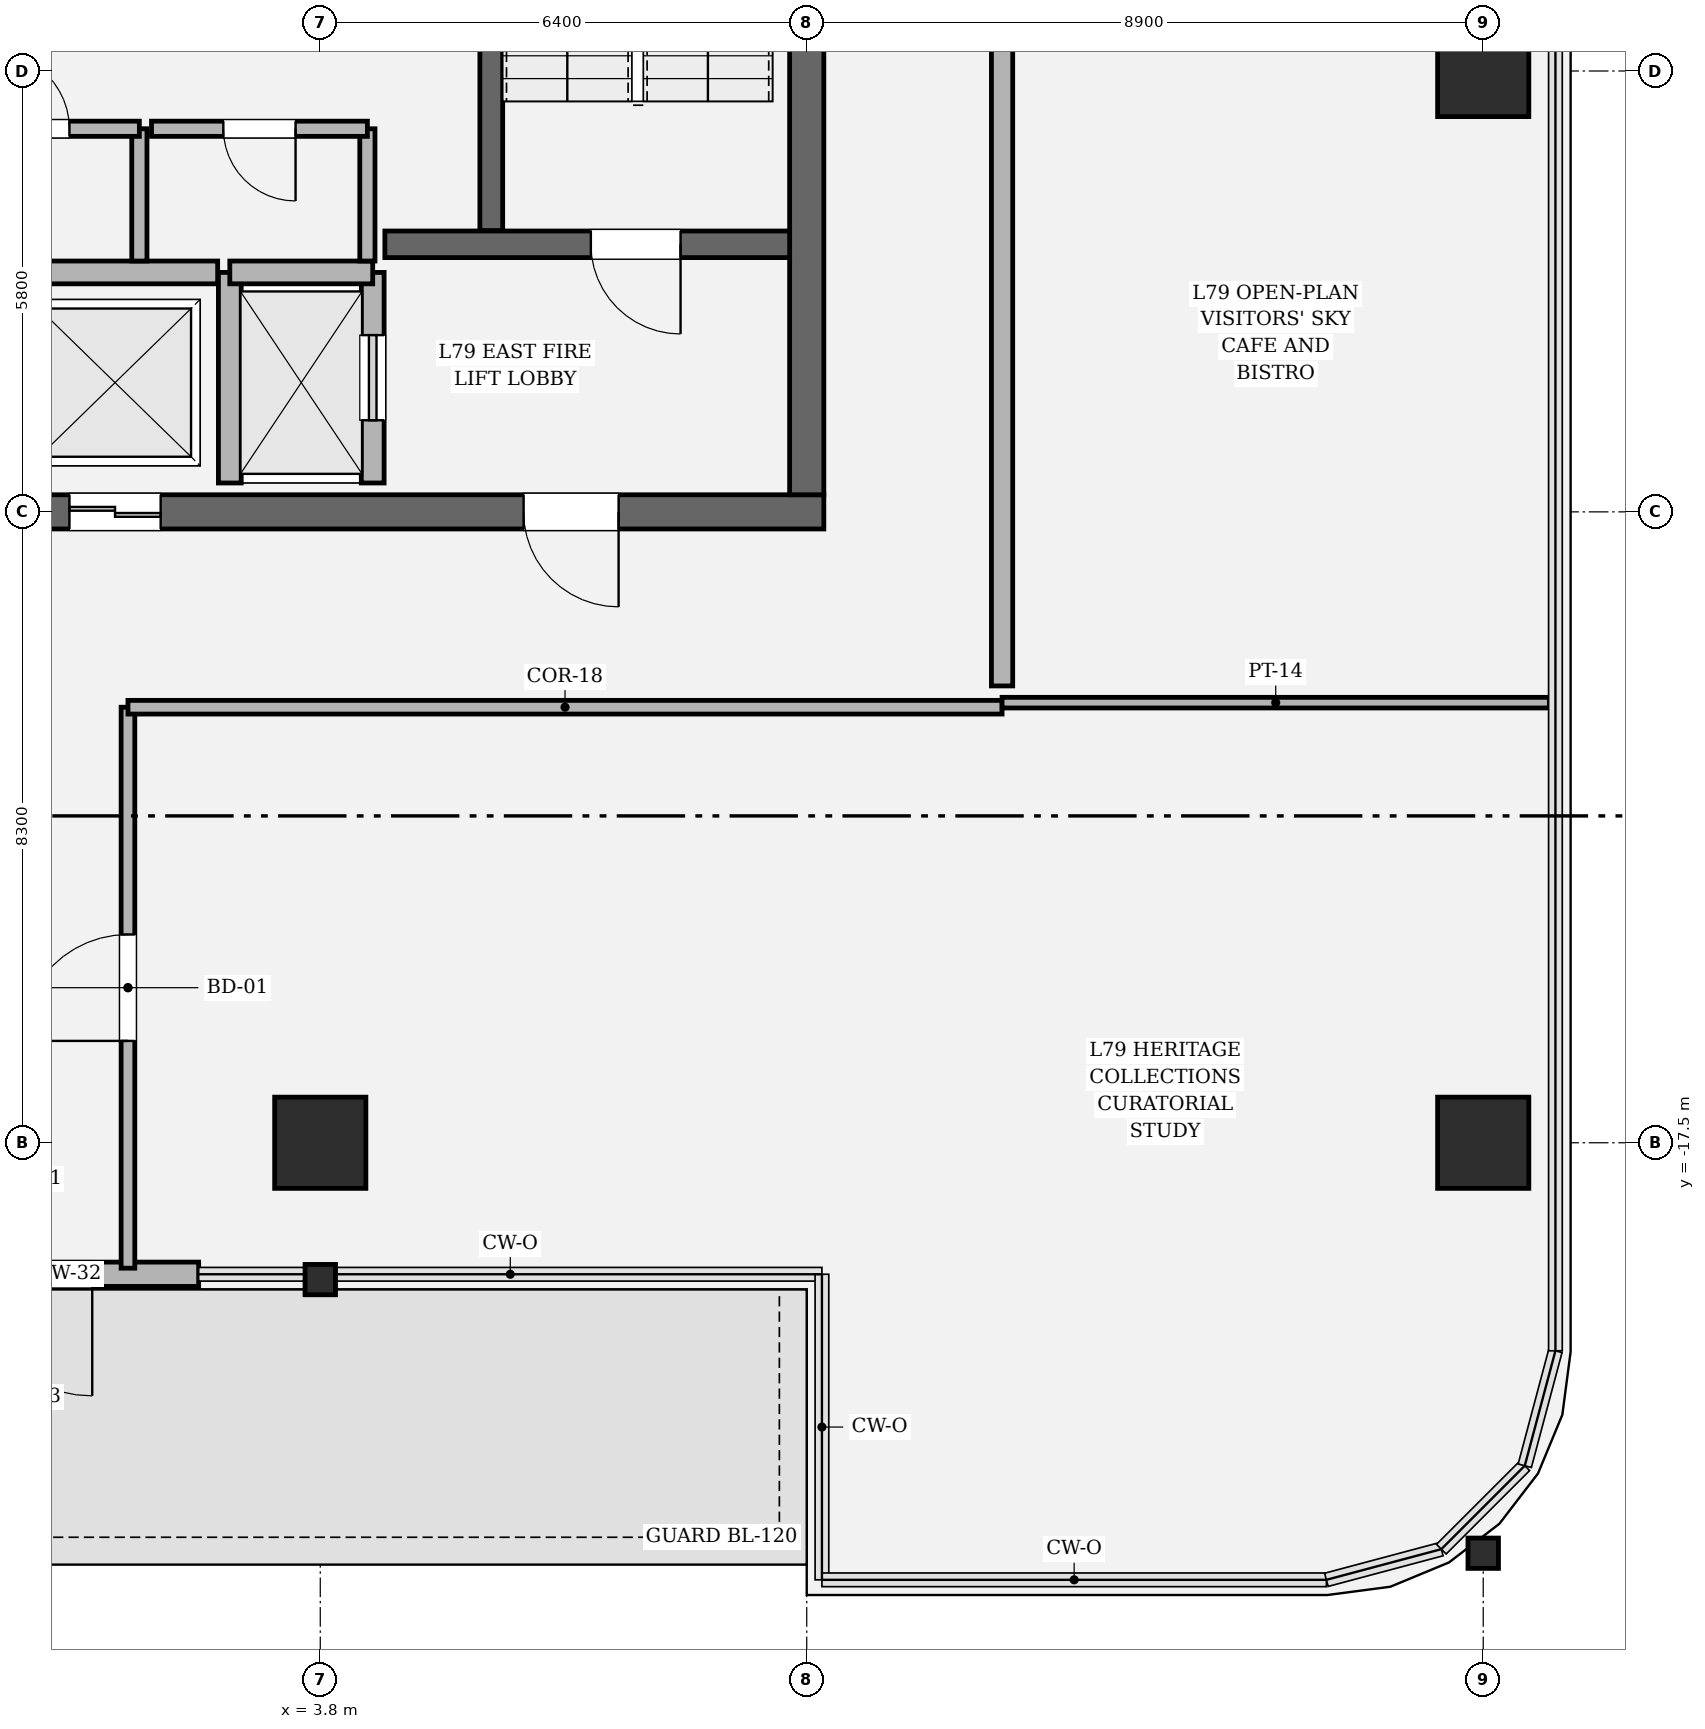
"""IFC4 building model, lengths in metres.
Left out: names, types, materials, properties, quantities, classifications, styles, units other than length and angle.
Written with IfcOpenShell. Run it as: python <this file> out.ifc"""

import sys

from ifc_helpers import new_model, si_unit, direction, frame, frame_2d, origin, origin_2d, place, context, subcontext, project, spatial, rectangle, hollow_rectangle, i_section, extrude, element, fill, save


model = new_model("IFC4")
c1 = context("Model", 3, precision=1e-05, world=origin(), true_north=direction((0.0, 1.0)))
c2 = subcontext(c1, "Body", "Model", "MODEL_VIEW")
j1 = project(units=[si_unit("LENGTHUNIT", "METRE"), si_unit("PLANEANGLEUNIT", "RADIAN")], contexts=[c1])
p1 = place(None, origin())
s1 = spatial("IfcSite", under=j1, at=p1, CompositionType="ELEMENT")
p2 = place(p1, origin())
s2 = spatial("IfcBuilding", under=s1, at=p2, CompositionType="ELEMENT")
p3 = place(p2, frame((0.0, 0.0, 334.2)))
s3 = spatial("IfcBuildingStorey", under=s2, at=p3, CompositionType="ELEMENT", Elevation=334.2)
p4 = place(p3, frame((10.425, -9.2, 0.0), z_axis=(0.0, 0.0, 1.0), x_axis=(-1.0, 0.0, 0.0)))
e1 = element("IfcWall", 1, at=p4, inside=s3, PredefinedType="SHEAR", context=c2, shape_type="SweptSolid", body=[
    extrude(rectangle(XDim=20.85, YDim=0.45, at=frame_2d((10.425, 0.0))), origin(), (0.0, 0.0, 1.0), 4.8),
])
p5 = place(p4, frame((2.7, 0.0, 0.0)))
e2 = element("IfcOpeningElement", 2, at=p5, cuts=e1, PredefinedType="OPENING", context=c2, shape_type="SweptSolid", body=[
    extrude(rectangle(XDim=1.25, YDim=2.25, at=frame_2d((0.625, 1.125))), frame((0.0, 0.235, 0.0), z_axis=(0.0, -1.0, 0.0), x_axis=(1.0, 0.0, 0.0)), (0.0, 0.0, 1.0), 0.47),
])
p6 = place(p4, frame((16.9, 0.0, 0.0)))
e3 = element("IfcOpeningElement", 3, at=p6, cuts=e1, PredefinedType="OPENING", context=c2, shape_type="SweptSolid", body=[
    extrude(rectangle(XDim=1.25, YDim=2.25, at=frame_2d((0.625, 1.125))), frame((0.0, 0.235, 0.0), z_axis=(0.0, -1.0, 0.0), x_axis=(1.0, 0.0, 0.0)), (0.0, 0.0, 1.0), 0.47),
])
p7 = place(p4, frame((10.925, 0.0, 0.0)))
e4 = element("IfcOpeningElement", 4, at=p7, cuts=e1, PredefinedType="OPENING", context=c2, shape_type="SweptSolid", body=[
    extrude(rectangle(XDim=1.2, YDim=2.3, at=frame_2d((0.6, 1.15))), frame((0.0, 0.235, 0.0), z_axis=(0.0, -1.0, 0.0), x_axis=(1.0, 0.0, 0.0)), (0.0, 0.0, 1.0), 0.47),
])
p8 = place(p4, frame((8.725, 0.0, 0.0)))
e5 = element("IfcOpeningElement", 5, at=p8, cuts=e1, PredefinedType="OPENING", context=c2, shape_type="SweptSolid", body=[
    extrude(rectangle(XDim=1.2, YDim=2.3, at=frame_2d((0.6, 1.15))), frame((0.0, 0.235, 0.0), z_axis=(0.0, -1.0, 0.0), x_axis=(1.0, 0.0, 0.0)), (0.0, 0.0, 1.0), 0.47),
])
p9 = place(p3, frame((10.2, 8.975, 0.0), z_axis=(0.0, 0.0, 1.0), x_axis=(0.0, -1.0, 0.0)))
e6 = element("IfcWall", 6, at=p9, inside=s3, PredefinedType="SHEAR", context=c2, shape_type="SweptSolid", body=[
    extrude(rectangle(XDim=17.95, YDim=0.45, at=frame_2d((8.975, 0.0))), origin(), (0.0, 0.0, 1.0), 4.8),
])
p10 = place(p9, frame((4.005, 0.0, 0.0)))
e7 = element("IfcOpeningElement", 7, at=p10, cuts=e6, PredefinedType="OPENING", context=c2, shape_type="SweptSolid", body=[
    extrude(rectangle(XDim=1.18, YDim=2.2, at=frame_2d((0.59, 1.1))), frame((0.0, 0.235, 0.0), z_axis=(0.0, -1.0, 0.0), x_axis=(1.0, 0.0, 0.0)), (0.0, 0.0, 1.0), 0.47),
])
p11 = place(p3, frame((6.05, 3.45, 0.0), z_axis=(0.0, 0.0, 1.0), x_axis=(0.0, -1.0, 0.0)))
e8 = element("IfcWall", 8, at=p11, inside=s3, PredefinedType="SOLIDWALL", context=c2, shape_type="SweptSolid", body=[
    extrude(rectangle(XDim=8.95, YDim=0.3, at=frame_2d((4.475, 0.0))), origin(), (0.0, 0.0, 1.0), 4.8),
])
p12 = place(p3, frame((4.65, -5.68, 0.0), z_axis=(0.0, 0.0, 1.0), x_axis=(1.0, 0.0, 0.0)))
e9 = element("IfcWall", 9, at=p12, inside=s3, PredefinedType="SOLIDWALL", context=c2, shape_type="SweptSolid", body=[
    extrude(rectangle(XDim=5.325, YDim=0.35, at=frame_2d((2.663, 0.0))), origin(), (0.0, 0.0, 1.0), 4.8),
])
p13 = place(p12, frame((2.71, 0.0, 0.0)))
e10 = element("IfcOpeningElement", 10, at=p13, cuts=e9, PredefinedType="OPENING", context=c2, shape_type="SweptSolid", body=[
    extrude(rectangle(XDim=1.18, YDim=2.2, at=frame_2d((0.59, 1.1))), frame((0.0, 0.185, 0.0), z_axis=(0.0, -1.0, 0.0), x_axis=(1.0, 0.0, 0.0)), (0.0, 0.0, 1.0), 0.37),
])
for number, where, z_axis, x_axis in (
    (11, (3.8, -17.5, 0.0), (0.0, 0.0, 1.0), (1.0, 0.0, 0.0)),
    (12, (19.1, -17.5, 0.0), (0.0, 0.0, 1.0), (1.0, 0.0, 0.0)),
    (13, (19.1, -3.4, 0.0), (0.0, 0.0, 1.0), (1.0, 0.0, 0.0)),
):
    element("IfcColumn", number, at=place(p3, frame(where, z_axis=z_axis, x_axis=x_axis)), inside=s3, PredefinedType="COLUMN", context=c2, shape_type="SweptSolid", body=[
        extrude(hollow_rectangle(XDim=1.2, YDim=1.2, WallThickness=0.035, at=origin_2d()), origin(), (0.0, 0.0, 1.0), 4.8),
    ])
for number, where, z_axis, x_axis in (
    (14, (3.8, -19.3, 0.0), (0.0, 0.0, 1.0), (1.0, 0.0, 0.0)),
    (15, (19.1, -22.9, 0.0), (0.0, 0.0, 1.0), (1.0, 0.0, 0.0)),
):
    element("IfcColumn", number, at=place(p3, frame(where, z_axis=z_axis, x_axis=x_axis)), inside=s3, PredefinedType="COLUMN", context=c2, shape_type="SweptSolid", body=[
        extrude(i_section(OverallWidth=0.401, OverallDepth=0.399, WebThickness=0.025, FlangeThickness=0.04, FilletRadius=0.018, at=origin_2d()), origin(), (0.0, 0.0, 1.0), 4.798),
    ])
p14 = place(p3, frame((-2.2, -19.23, 0.0), z_axis=(0.0, 0.0, 1.0), x_axis=(1.0, 0.0, 0.0)))
e16 = element("IfcWall", 16, at=p14, inside=s3, PredefinedType="SOLIDWALL", context=c2, shape_type="SweptSolid", body=[
    extrude(rectangle(XDim=4.4, YDim=0.32, at=frame_2d((2.2, 0.0))), origin(), (0.0, 0.0, 1.0), 4.54),
])
p15 = place(p14, frame((1.4, 0.0, 0.0)))
e17 = element("IfcOpeningElement", 17, at=p15, cuts=e16, PredefinedType="OPENING", context=c2, shape_type="SweptSolid", body=[
    extrude(rectangle(XDim=1.6, YDim=2.35, at=frame_2d((0.8, 1.175))), frame((0.0, 0.17, 0.0), z_axis=(0.0, -1.0, 0.0), x_axis=(1.0, 0.0, 0.0)), (0.0, 0.0, 1.0), 0.34),
])
p16 = place(p3, frame((4.49, -8.82, 0.0), z_axis=(0.0, 0.0, 1.0), x_axis=(0.0, 1.0, 0.0)))
e18 = element("IfcWall", 18, at=p16, inside=s3, PredefinedType="SOLIDWALL", context=c2, shape_type="SweptSolid", body=[
    extrude(rectangle(XDim=2.77, YDim=0.3, at=frame_2d((1.385, 0.0))), origin(), (0.0, 0.0, 1.0), 4.54),
])
p17 = place(p16, frame((0.825, 0.0, 0.0)))
e19 = element("IfcOpeningElement", 19, at=p17, cuts=e18, PredefinedType="OPENING", context=c2, shape_type="SweptSolid", body=[
    extrude(rectangle(XDim=1.12, YDim=2.25, at=frame_2d((0.56, 1.125))), frame((0.0, 0.16, 0.0), z_axis=(0.0, -1.0, 0.0), x_axis=(1.0, 0.0, 0.0)), (0.0, 0.0, 1.0), 0.32),
])
p18 = place(p3, frame((2.61, -8.82, 0.0), z_axis=(0.0, 0.0, 1.0), x_axis=(0.0, 1.0, 0.0)))
e20 = element("IfcWall", 20, at=p18, inside=s3, PredefinedType="SOLIDWALL", context=c2, shape_type="SweptSolid", body=[
    extrude(rectangle(XDim=2.77, YDim=0.3, at=frame_2d((1.385, 0.0))), origin(), (0.0, 0.0, 1.0), 4.54),
])
p19 = place(p3, frame((2.61, -6.05, 0.0), z_axis=(0.0, 0.0, 1.0), x_axis=(1.0, 0.0, 0.0)))
e21 = element("IfcWall", 21, at=p19, inside=s3, PredefinedType="SOLIDWALL", context=c2, shape_type="SweptSolid", body=[
    extrude(rectangle(XDim=1.88, YDim=0.3, at=frame_2d((0.94, 0.0))), origin(), (0.0, 0.0, 1.0), 4.54),
])
p20 = place(p3, frame((-2.45, -6.05, 0.0), z_axis=(0.0, 0.0, 1.0), x_axis=(1.0, 0.0, 0.0)))
e22 = element("IfcWall", 22, at=p20, inside=s3, PredefinedType="SOLIDWALL", context=c2, shape_type="SweptSolid", body=[
    extrude(rectangle(XDim=4.9, YDim=0.3, at=frame_2d((2.45, 0.0))), origin(), (0.0, 0.0, 1.0), 4.54),
])
p21 = place(p3, frame((1.42, -5.9, 0.0), z_axis=(0.0, 0.0, 1.0), x_axis=(0.0, 1.0, 0.0)))
e23 = element("IfcWall", 23, at=p21, inside=s3, PredefinedType="SOLIDWALL", context=c2, shape_type="SweptSolid", body=[
    extrude(rectangle(XDim=1.74, YDim=0.2, at=frame_2d((0.87, 0.0))), origin(), (0.0, 0.0, 1.0), 4.54),
])
p22 = place(p3, frame((1.42, -4.16, 0.0), z_axis=(0.0, 0.0, 1.0), x_axis=(-1.0, 0.0, 0.0)))
e24 = element("IfcWall", 24, at=p22, inside=s3, PredefinedType="SOLIDWALL", context=c2, shape_type="SweptSolid", body=[
    extrude(rectangle(XDim=2.84, YDim=0.2, at=frame_2d((1.42, 0.0))), origin(), (0.0, 0.0, 1.0), 4.54),
])
p23 = place(p22, frame((0.92, 0.0, 0.0)))
e25 = element("IfcOpeningElement", 25, at=p23, cuts=e24, PredefinedType="OPENING", context=c2, shape_type="SweptSolid", body=[
    extrude(rectangle(XDim=1.0, YDim=2.15, at=frame_2d((0.5, 1.075))), frame((0.0, 0.11, 0.0), z_axis=(0.0, -1.0, 0.0), x_axis=(1.0, 0.0, 0.0)), (0.0, 0.0, 1.0), 0.22),
])
p24 = place(p3, frame((4.42, -5.9, 0.0), z_axis=(0.0, 0.0, 1.0), x_axis=(0.0, 1.0, 0.0)))
e26 = element("IfcWall", 26, at=p24, inside=s3, PredefinedType="SOLIDWALL", context=c2, shape_type="SweptSolid", body=[
    extrude(rectangle(XDim=1.74, YDim=0.2, at=frame_2d((0.87, 0.0))), origin(), (0.0, 0.0, 1.0), 4.54),
])
p25 = place(p3, frame((4.42, -4.16, 0.0), z_axis=(0.0, 0.0, 1.0), x_axis=(-1.0, 0.0, 0.0)))
e27 = element("IfcWall", 27, at=p25, inside=s3, PredefinedType="SOLIDWALL", context=c2, shape_type="SweptSolid", body=[
    extrude(rectangle(XDim=2.84, YDim=0.2, at=frame_2d((1.42, 0.0))), origin(), (0.0, 0.0, 1.0), 4.54),
])
p26 = place(p25, frame((0.945, 0.0, 0.0)))
e28 = element("IfcOpeningElement", 28, at=p26, cuts=e27, PredefinedType="OPENING", context=c2, shape_type="SweptSolid", body=[
    extrude(rectangle(XDim=0.95, YDim=2.15, at=frame_2d((0.475, 1.075))), frame((0.0, 0.11, 0.0), z_axis=(0.0, -1.0, 0.0), x_axis=(1.0, 0.0, 0.0)), (0.0, 0.0, 1.0), 0.22),
])
p27 = place(p3, frame((1.27, -19.15, 0.0), z_axis=(0.0, 0.0, 1.0), x_axis=(0.0, 1.0, 0.0)))
e29 = element("IfcWall", 29, at=p27, inside=s3, PredefinedType="PARTITIONING", context=c2, shape_type="SweptSolid", body=[
    extrude(rectangle(XDim=7.38, YDim=0.18, at=frame_2d((3.69, 0.0))), origin(), (0.0, 0.0, 1.0), 3.214),
])
p28 = place(p27, frame((2.99, 0.0, 0.0)))
e30 = element("IfcOpeningElement", 30, at=p28, cuts=e29, PredefinedType="OPENING", context=c2, shape_type="SweptSolid", body=[
    extrude(rectangle(XDim=1.4, YDim=2.25, at=frame_2d((0.7, 1.125))), frame((0.0, 0.1, 0.0), z_axis=(0.0, -1.0, 0.0), x_axis=(1.0, 0.0, 0.0)), (0.0, 0.0, 1.0), 0.2),
])
p29 = place(p3, frame((1.27, -11.77, 0.0), z_axis=(0.0, 0.0, 1.0), x_axis=(1.0, 0.0, 0.0)))
e31 = element("IfcWall", 31, at=p29, inside=s3, PredefinedType="PARTITIONING", context=c2, shape_type="SweptSolid", body=[
    extrude(rectangle(XDim=11.5, YDim=0.18, at=frame_2d((5.75, 0.0))), origin(), (0.0, 0.0, 1.0), 3.214),
])
p30 = place(p3, frame((12.77, -11.71, 0.0), z_axis=(0.0, 0.0, 1.0), x_axis=(1.0, 0.0, 0.0)))
e32 = element("IfcWall", 32, at=p30, inside=s3, PredefinedType="PARTITIONING", context=c2, shape_type="SweptSolid", body=[
    extrude(rectangle(XDim=7.2, YDim=0.14, at=frame_2d((3.6, 0.0))), origin(), (0.0, 0.0, 1.0), 3.214),
])
p31 = place(p3, frame((12.77, -11.49, 0.0), z_axis=(0.0, 0.0, 1.0), x_axis=(0.0, 1.0, 0.0)))
e33 = element("IfcWall", 33, at=p31, inside=s3, PredefinedType="SOLIDWALL", context=c2, shape_type="SweptSolid", body=[
    extrude(rectangle(XDim=10.14, YDim=0.28, at=frame_2d((5.07, 0.0))), origin(), (0.0, 0.0, 1.0), 3.214),
])
p32 = place(p15, origin())
e34 = element("IfcDoor", 34, at=p32, inside=s3, OperationType="SINGLE_SWING_RIGHT", PredefinedType="DOOR", context=c2, shape_type="SweptSolid", body=[
    extrude(rectangle(XDim=1.6, YDim=2.35, at=frame_2d((0.8, 1.175))), frame((0.0, 0.025, 0.0), z_axis=(0.0, -1.0, 0.0), x_axis=(1.0, 0.0, 0.0)), (0.0, 0.0, 1.0), 0.05),
])
fill(e17, e34)
p33 = place(p13, origin())
e35 = element("IfcDoor", 35, at=p33, inside=s3, OperationType="SINGLE_SWING_RIGHT", PredefinedType="DOOR", context=c2, shape_type="SweptSolid", body=[
    extrude(rectangle(XDim=1.18, YDim=2.2, at=frame_2d((0.59, 1.1))), frame((0.0, 0.025, 0.0), z_axis=(0.0, -1.0, 0.0), x_axis=(1.0, 0.0, 0.0)), (0.0, 0.0, 1.0), 0.05),
])
fill(e10, e35)
p34 = place(p5, origin())
e36 = element("IfcDoor", 36, at=p34, inside=s3, OperationType="SINGLE_SWING_LEFT", PredefinedType="DOOR", context=c2, shape_type="SweptSolid", body=[
    extrude(rectangle(XDim=1.25, YDim=2.25, at=frame_2d((0.625, 1.125))), frame((0.0, 0.025, 0.0), z_axis=(0.0, -1.0, 0.0), x_axis=(1.0, 0.0, 0.0)), (0.0, 0.0, 1.0), 0.05),
])
fill(e2, e36)
p35 = place(p17, origin())
e37 = element("IfcDoor", 37, at=p35, inside=s3, OperationType="SLIDING_TO_RIGHT", PredefinedType="DOOR", context=c2, shape_type="SweptSolid", body=[
    extrude(rectangle(XDim=1.12, YDim=2.25, at=frame_2d((0.56, 1.125))), frame((0.0, 0.025, 0.0), z_axis=(0.0, -1.0, 0.0), x_axis=(1.0, 0.0, 0.0)), (0.0, 0.0, 1.0), 0.05),
])
fill(e19, e37)
p36 = place(p8, origin())
e38 = element("IfcDoor", 38, at=p36, inside=s3, OperationType="DOUBLE_DOOR_SLIDING", PredefinedType="DOOR", context=c2, shape_type="SweptSolid", body=[
    extrude(rectangle(XDim=1.2, YDim=2.3, at=frame_2d((0.6, 1.15))), frame((0.0, 0.025, 0.0), z_axis=(0.0, -1.0, 0.0), x_axis=(1.0, 0.0, 0.0)), (0.0, 0.0, 1.0), 0.05),
])
fill(e5, e38)
p37 = place(p23, origin())
e39 = element("IfcDoor", 39, at=p37, inside=s3, OperationType="SINGLE_SWING_RIGHT", PredefinedType="DOOR", context=c2, shape_type="SweptSolid", body=[
    extrude(rectangle(XDim=1.0, YDim=2.15, at=frame_2d((0.5, 1.075))), frame((0.0, 0.025, 0.0), z_axis=(0.0, -1.0, 0.0), x_axis=(1.0, 0.0, 0.0)), (0.0, 0.0, 1.0), 0.05),
])
fill(e25, e39)
p38 = place(p26, origin())
e40 = element("IfcDoor", 40, at=p38, inside=s3, OperationType="SINGLE_SWING_LEFT", PredefinedType="DOOR", context=c2, shape_type="SweptSolid", body=[
    extrude(rectangle(XDim=0.95, YDim=2.15, at=frame_2d((0.475, 1.075))), frame((0.0, 0.025, 0.0), z_axis=(0.0, -1.0, 0.0), x_axis=(1.0, 0.0, 0.0)), (0.0, 0.0, 1.0), 0.05),
])
fill(e28, e40)
p39 = place(p28, origin())
e41 = element("IfcDoor", 41, at=p39, inside=s3, OperationType="SINGLE_SWING_LEFT", PredefinedType="DOOR", context=c2, shape_type="SweptSolid", body=[
    extrude(rectangle(XDim=1.4, YDim=2.25, at=frame_2d((0.7, 1.125))), frame((0.0, 0.025, 0.0), z_axis=(0.0, -1.0, 0.0), x_axis=(1.0, 0.0, 0.0)), (0.0, 0.0, 1.0), 0.05),
])
fill(e30, e41)
save(model, sys.argv[1])
